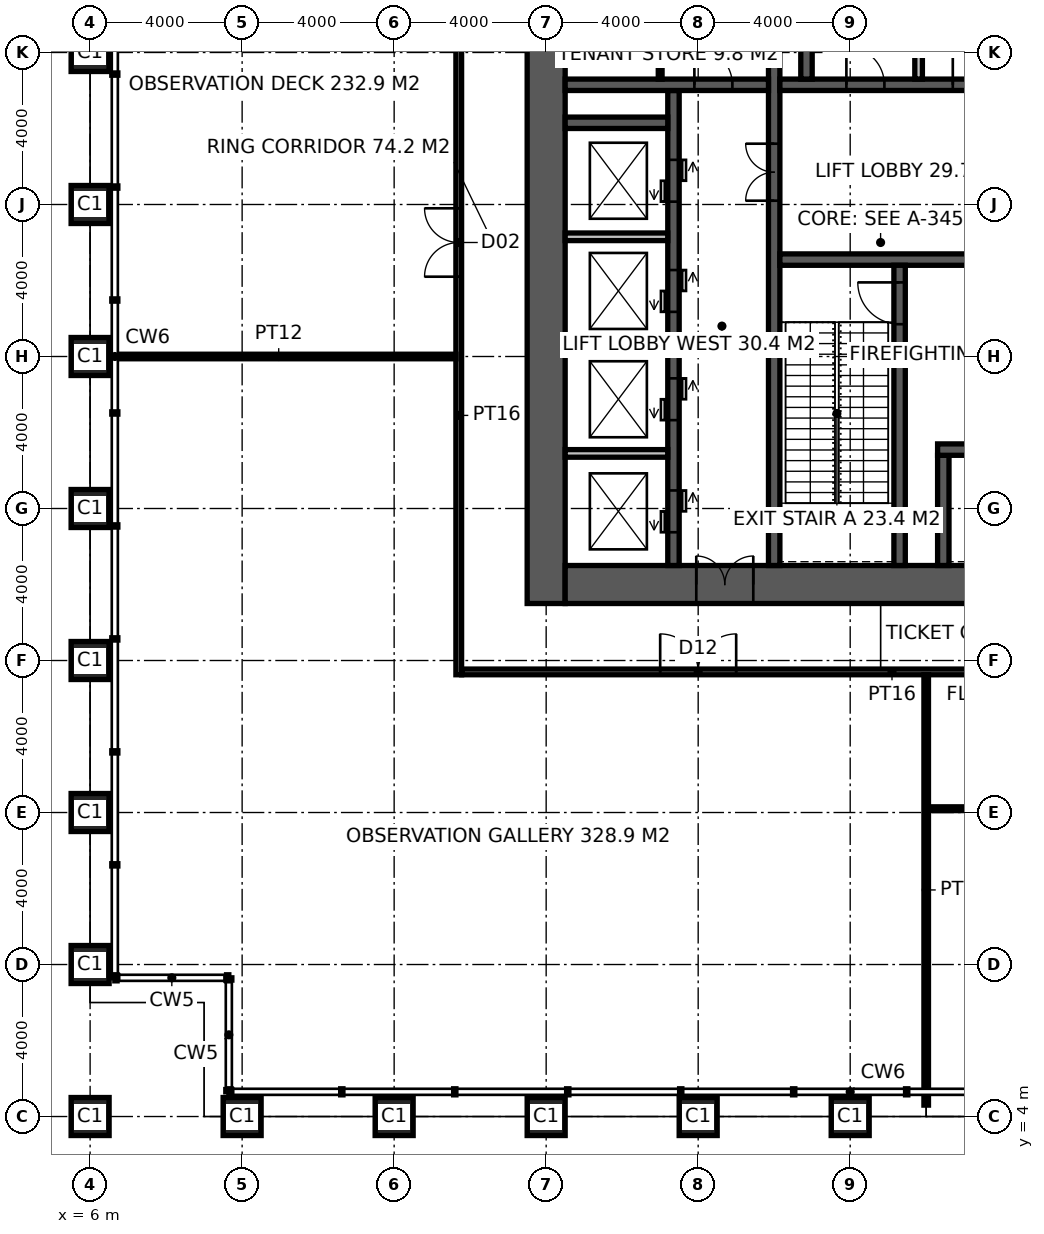
"""IFC4 building model, lengths in metres.
Left out: names, types, materials, properties, quantities, classifications, styles, units other than length and angle.
Written with IfcOpenShell. Run it as: python <this file> out.ifc"""

import sys

from ifc_helpers import new_model, si_unit, direction, frame, frame_2d, origin, origin_2d, place, context, subcontext, project, spatial, rectangle, hollow_rectangle, extrude, element, fill, save


model = new_model("IFC4")
c1 = context("Model", 3, precision=1e-05, world=origin(), true_north=direction((0.0, 1.0)))
c2 = subcontext(c1, "Body", "Model", "MODEL_VIEW")
j1 = project(units=[si_unit("LENGTHUNIT", "METRE"), si_unit("PLANEANGLEUNIT", "RADIAN")], contexts=[c1])
p1 = place(None, origin())
s1 = spatial("IfcSite", under=j1, at=p1, CompositionType="ELEMENT")
p2 = place(p1, origin())
s2 = spatial("IfcBuilding", under=s1, at=p2, CompositionType="ELEMENT")
p3 = place(p2, frame((0.0, 0.0, 298.2)))
s3 = spatial("IfcBuildingStorey", under=s2, at=p3, CompositionType="ELEMENT", Elevation=298.2)
p4 = place(p3, frame((6.0, 4.0, 0.0), z_axis=(0.0, 0.0, 1.0), x_axis=(1.0, 0.0, 0.0)))
e1 = element("IfcColumn", 1, at=p4, inside=s3, PredefinedType="COLUMN", context=c2, shape_type="SweptSolid", body=[
    extrude(hollow_rectangle(XDim=1.0, YDim=1.0, WallThickness=0.1, at=origin_2d()), origin(), (0.0, 0.0, 1.0), 6.0),
    extrude(rectangle(XDim=0.99, YDim=0.99, at=origin_2d()), frame((0.0, 0.0, 5.96)), (0.0, 0.0, 1.0), 0.04),
])
for number, where, z_axis, x_axis in (
    (2, (6.0, 8.0, 0.0), (0.0, 0.0, 1.0), (1.0, 0.0, 0.0)),
    (3, (6.0, 12.0, 0.0), (0.0, 0.0, 1.0), (1.0, 0.0, 0.0)),
    (4, (6.0, 16.0, 0.0), (0.0, 0.0, 1.0), (1.0, 0.0, 0.0)),
    (5, (6.0, 20.0, 0.0), (0.0, 0.0, 1.0), (1.0, 0.0, 0.0)),
    (6, (6.0, 24.0, 0.0), (0.0, 0.0, 1.0), (1.0, 0.0, 0.0)),
    (7, (6.0, 28.0, 0.0), (0.0, 0.0, 1.0), (1.0, 0.0, 0.0)),
    (8, (6.0, 32.0, 0.0), (0.0, 0.0, 1.0), (1.0, 0.0, 0.0)),
    (9, (10.0, 4.0, 0.0), (0.0, 0.0, 1.0), (1.0, 0.0, 0.0)),
    (10, (14.0, 4.0, 0.0), (0.0, 0.0, 1.0), (1.0, 0.0, 0.0)),
    (11, (18.0, 4.0, 0.0), (0.0, 0.0, 1.0), (1.0, 0.0, 0.0)),
    (12, (22.0, 4.0, 0.0), (0.0, 0.0, 1.0), (1.0, 0.0, 0.0)),
    (13, (26.0, 4.0, 0.0), (0.0, 0.0, 1.0), (1.0, 0.0, 0.0)),
):
    element("IfcColumn", number, at=place(p3, frame(where, z_axis=z_axis, x_axis=x_axis)), inside=s3, PredefinedType="COLUMN", context=c2, shape_type="SweptSolid", body=[
        extrude(hollow_rectangle(XDim=1.0, YDim=1.0, WallThickness=0.1, at=origin_2d()), origin(), (0.0, 0.0, 1.0), 6.0),
    ])
p5 = place(p3, frame((18.0, 17.5, -0.15), z_axis=(0.0, 0.0, 1.0), x_axis=(0.0, 1.0, 0.0)))
e14 = element("IfcWall", 14, at=p5, inside=s3, PredefinedType="SHEAR", context=c2, shape_type="SweptSolid", body=[
    extrude(rectangle(XDim=19.0, YDim=1.0, at=frame_2d((9.5, 0.0))), origin(), (0.0, 0.0, 1.0), 5.85),
])
p6 = place(p3, frame((18.5, 18.0, -0.15), z_axis=(0.0, 0.0, 1.0), x_axis=(1.0, 0.0, 0.0)))
e15 = element("IfcWall", 15, at=p6, inside=s3, PredefinedType="SHEAR", context=c2, shape_type="SweptSolid", body=[
    extrude(rectangle(XDim=17.6, YDim=1.0, at=frame_2d((8.8, 0.0))), origin(), (0.0, 0.0, 1.0), 5.85),
])
p7 = place(p6, frame((3.45, 0.0, 0.15)))
e16 = element("IfcOpeningElement", 16, at=p7, cuts=e15, PredefinedType="OPENING", context=c2, shape_type="SweptSolid", body=[
    extrude(rectangle(XDim=1.5, YDim=2.4, at=frame_2d((0.75, 1.2))), frame((0.0, 0.51, 0.0), z_axis=(0.0, -1.0, 0.0), x_axis=(1.0, 0.0, 0.0)), (0.0, 0.0, 1.0), 1.02),
])
p8 = place(p3, frame((24.0, 18.5, -0.15), z_axis=(0.0, 0.0, 1.0), x_axis=(0.0, 1.0, 0.0)))
e17 = element("IfcWall", 17, at=p8, inside=s3, PredefinedType="SHEAR", context=c2, shape_type="SweptSolid", body=[
    extrude(rectangle(XDim=17.0, YDim=0.3, at=frame_2d((8.5, 0.0))), origin(), (0.0, 0.0, 1.0), 5.85),
])
p9 = place(p8, frame((9.6, 0.0, 0.15)))
e18 = element("IfcOpeningElement", 18, at=p9, cuts=e17, PredefinedType="OPENING", context=c2, shape_type="SweptSolid", body=[
    extrude(rectangle(XDim=1.5, YDim=2.4, at=frame_2d((0.75, 1.2))), frame((0.0, 0.16, 0.0), z_axis=(0.0, -1.0, 0.0), x_axis=(1.0, 0.0, 0.0)), (0.0, 0.0, 1.0), 0.32),
])
p10 = place(p3, frame((24.15, 26.55, -0.15), z_axis=(0.0, 0.0, 1.0), x_axis=(1.0, 0.0, 0.0)))
e19 = element("IfcWall", 19, at=p10, inside=s3, PredefinedType="SHEAR", context=c2, shape_type="SweptSolid", body=[
    extrude(rectangle(XDim=11.25, YDim=0.3, at=frame_2d((5.625, 0.0))), origin(), (0.0, 0.0, 1.0), 5.85),
])
p11 = place(p10, frame((9.2, 0.0, 0.15)))
e20 = element("IfcOpeningElement", 20, at=p11, cuts=e19, PredefinedType="OPENING", context=c2, shape_type="SweptSolid", body=[
    extrude(rectangle(XDim=1.1, YDim=2.2, at=frame_2d((0.55, 1.1))), frame((0.0, 0.16, 0.0), z_axis=(0.0, -1.0, 0.0), x_axis=(1.0, 0.0, 0.0)), (0.0, 0.0, 1.0), 0.32),
])
p12 = place(p10, frame((4.9, 0.0, 0.15)))
e21 = element("IfcOpeningElement", 21, at=p12, cuts=e19, PredefinedType="OPENING", context=c2, shape_type="SweptSolid", body=[
    extrude(rectangle(XDim=1.5, YDim=2.4, at=frame_2d((0.75, 1.2))), frame((0.0, 0.16, 0.0), z_axis=(0.0, -1.0, 0.0), x_axis=(1.0, 0.0, 0.0)), (0.0, 0.0, 1.0), 0.32),
])
p13 = place(p3, frame((27.3, 18.5, -0.15), z_axis=(0.0, 0.0, 1.0), x_axis=(0.0, 1.0, 0.0)))
e22 = element("IfcWall", 22, at=p13, inside=s3, PredefinedType="SHEAR", context=c2, shape_type="SweptSolid", body=[
    extrude(rectangle(XDim=7.9, YDim=0.3, at=frame_2d((3.95, 0.0))), origin(), (0.0, 0.0, 1.0), 5.85),
])
p14 = place(p13, frame((6.35, 0.0, 0.15)))
e23 = element("IfcOpeningElement", 23, at=p14, cuts=e22, PredefinedType="OPENING", context=c2, shape_type="SweptSolid", body=[
    extrude(rectangle(XDim=1.1, YDim=2.2, at=frame_2d((0.55, 1.1))), frame((0.0, 0.16, 0.0), z_axis=(0.0, -1.0, 0.0), x_axis=(1.0, 0.0, 0.0)), (0.0, 0.0, 1.0), 0.32),
])
p15 = place(p3, frame((28.45, 18.5, -0.15), z_axis=(0.0, 0.0, 1.0), x_axis=(0.0, 1.0, 0.0)))
e24 = element("IfcWall", 24, at=p15, inside=s3, PredefinedType="SHEAR", context=c2, shape_type="SweptSolid", body=[
    extrude(rectangle(XDim=2.9, YDim=0.3, at=frame_2d((1.45, 0.0))), origin(), (0.0, 0.0, 1.0), 5.85),
])
p16 = place(p3, frame((28.3, 21.55, -0.15), z_axis=(0.0, 0.0, 1.0), x_axis=(1.0, 0.0, 0.0)))
e25 = element("IfcWall", 25, at=p16, inside=s3, PredefinedType="SHEAR", context=c2, shape_type="SweptSolid", body=[
    extrude(rectangle(XDim=3.8, YDim=0.3, at=frame_2d((1.9, 0.0))), origin(), (0.0, 0.0, 1.0), 5.85),
])
p17 = place(p16, frame((1.05, 0.0, 0.15)))
e26 = element("IfcOpeningElement", 26, at=p17, cuts=e25, PredefinedType="OPENING", context=c2, shape_type="SweptSolid", body=[
    extrude(rectangle(XDim=1.3, YDim=2.4, at=frame_2d((0.65, 1.2))), frame((0.0, 0.16, 0.0), z_axis=(0.0, -1.0, 0.0), x_axis=(1.0, 0.0, 0.0)), (0.0, 0.0, 1.0), 0.32),
])
p18 = place(p3, frame((24.15, 31.15, -0.15), z_axis=(0.0, 0.0, 1.0), x_axis=(1.0, 0.0, 0.0)))
e27 = element("IfcWall", 27, at=p18, inside=s3, PredefinedType="SHEAR", context=c2, shape_type="SweptSolid", body=[
    extrude(rectangle(XDim=11.25, YDim=0.3, at=frame_2d((5.625, 0.0))), origin(), (0.0, 0.0, 1.0), 5.85),
])
p19 = place(p18, frame((1.75, 0.0, 0.15)))
e28 = element("IfcOpeningElement", 28, at=p19, cuts=e27, PredefinedType="OPENING", context=c2, shape_type="SweptSolid", body=[
    extrude(rectangle(XDim=1.0, YDim=2.2, at=frame_2d((0.5, 1.1))), frame((0.0, 0.16, 0.0), z_axis=(0.0, -1.0, 0.0), x_axis=(1.0, 0.0, 0.0)), (0.0, 0.0, 1.0), 0.32),
])
p20 = place(p18, frame((4.55, 0.0, 0.15)))
e29 = element("IfcOpeningElement", 29, at=p20, cuts=e27, PredefinedType="OPENING", context=c2, shape_type="SweptSolid", body=[
    extrude(rectangle(XDim=1.0, YDim=2.2, at=frame_2d((0.5, 1.1))), frame((0.0, 0.16, 0.0), z_axis=(0.0, -1.0, 0.0), x_axis=(1.0, 0.0, 0.0)), (0.0, 0.0, 1.0), 0.32),
])
p21 = place(p18, frame((7.25, 0.0, 0.15)))
e30 = element("IfcOpeningElement", 30, at=p21, cuts=e27, PredefinedType="OPENING", context=c2, shape_type="SweptSolid", body=[
    extrude(rectangle(XDim=1.4, YDim=2.4, at=frame_2d((0.7, 1.2))), frame((0.0, 0.16, 0.0), z_axis=(0.0, -1.0, 0.0), x_axis=(1.0, 0.0, 0.0)), (0.0, 0.0, 1.0), 0.32),
])
p22 = place(p3, frame((21.35, 18.5, -0.15), z_axis=(0.0, 0.0, 1.0), x_axis=(0.0, 1.0, 0.0)))
e31 = element("IfcWall", 31, at=p22, inside=s3, PredefinedType="SHEAR", context=c2, shape_type="SweptSolid", body=[
    extrude(rectangle(XDim=12.5, YDim=0.3, at=frame_2d((6.25, 0.0))), origin(), (0.0, 0.0, 1.0), 5.85),
])
p23 = place(p22, frame((0.875, 0.0, 0.15)))
e32 = element("IfcOpeningElement", 32, at=p23, cuts=e31, PredefinedType="OPENING", context=c2, shape_type="SweptSolid", body=[
    extrude(rectangle(XDim=1.1, YDim=2.2, at=frame_2d((0.55, 1.1))), frame((0.0, 0.16, 0.0), z_axis=(0.0, -1.0, 0.0), x_axis=(1.0, 0.0, 0.0)), (0.0, 0.0, 1.0), 0.32),
])
p24 = place(p22, frame((3.825, 0.0, 0.15)))
e33 = element("IfcOpeningElement", 33, at=p24, cuts=e31, PredefinedType="OPENING", context=c2, shape_type="SweptSolid", body=[
    extrude(rectangle(XDim=1.1, YDim=2.2, at=frame_2d((0.55, 1.1))), frame((0.0, 0.16, 0.0), z_axis=(0.0, -1.0, 0.0), x_axis=(1.0, 0.0, 0.0)), (0.0, 0.0, 1.0), 0.32),
])
p25 = place(p22, frame((6.675, 0.0, 0.15)))
e34 = element("IfcOpeningElement", 34, at=p25, cuts=e31, PredefinedType="OPENING", context=c2, shape_type="SweptSolid", body=[
    extrude(rectangle(XDim=1.1, YDim=2.2, at=frame_2d((0.55, 1.1))), frame((0.0, 0.16, 0.0), z_axis=(0.0, -1.0, 0.0), x_axis=(1.0, 0.0, 0.0)), (0.0, 0.0, 1.0), 0.32),
])
p26 = place(p22, frame((9.575, 0.0, 0.15)))
e35 = element("IfcOpeningElement", 35, at=p26, cuts=e31, PredefinedType="OPENING", context=c2, shape_type="SweptSolid", body=[
    extrude(rectangle(XDim=1.1, YDim=2.2, at=frame_2d((0.55, 1.1))), frame((0.0, 0.16, 0.0), z_axis=(0.0, -1.0, 0.0), x_axis=(1.0, 0.0, 0.0)), (0.0, 0.0, 1.0), 0.32),
])
p27 = place(p3, frame((18.5, 31.15, -0.15), z_axis=(0.0, 0.0, 1.0), x_axis=(1.0, 0.0, 0.0)))
e36 = element("IfcWall", 36, at=p27, inside=s3, PredefinedType="SHEAR", context=c2, shape_type="SweptSolid", body=[
    extrude(rectangle(XDim=5.35, YDim=0.3, at=frame_2d((2.675, 0.0))), origin(), (0.0, 0.0, 1.0), 5.85),
])
p28 = place(p27, frame((3.4, 0.0, 0.15)))
e37 = element("IfcOpeningElement", 37, at=p28, cuts=e36, PredefinedType="OPENING", context=c2, shape_type="SweptSolid", body=[
    extrude(rectangle(XDim=1.0, YDim=2.2, at=frame_2d((0.5, 1.1))), frame((0.0, 0.16, 0.0), z_axis=(0.0, -1.0, 0.0), x_axis=(1.0, 0.0, 0.0)), (0.0, 0.0, 1.0), 0.32),
])
p29 = place(p3, frame((18.5, 30.15, -0.15), z_axis=(0.0, 0.0, 1.0), x_axis=(1.0, 0.0, 0.0)))
e38 = element("IfcWall", 38, at=p29, inside=s3, PredefinedType="SHEAR", context=c2, shape_type="SweptSolid", body=[
    extrude(rectangle(XDim=2.7, YDim=0.3, at=frame_2d((1.35, 0.0))), origin(), (0.0, 0.0, 1.0), 5.85),
])
p30 = place(p3, frame((24.85, 31.3, -0.15), z_axis=(0.0, 0.0, 1.0), x_axis=(0.0, 1.0, 0.0)))
e39 = element("IfcWall", 39, at=p30, inside=s3, PredefinedType="SHEAR", context=c2, shape_type="SweptSolid", body=[
    extrude(rectangle(XDim=4.2, YDim=0.3, at=frame_2d((2.1, 0.0))), origin(), (0.0, 0.0, 1.0), 5.85),
])
p31 = place(p3, frame((27.8, 31.3, 0.0), z_axis=(0.0, 0.0, 1.0), x_axis=(0.0, 1.0, 0.0)))
e40 = element("IfcWall", 40, at=p31, inside=s3, PredefinedType="SOLIDWALL", context=c2, shape_type="SweptSolid", body=[
    extrude(rectangle(XDim=2.8, YDim=0.2, at=frame_2d((1.4, 0.0))), origin(), (0.0, 0.0, 1.0), 5.7),
])
for number, where, z_axis, x_axis in (
    (41, (18.5, 21.45, -0.15), (0.0, 0.0, 1.0), (1.0, 0.0, 0.0)),
    (42, (18.5, 24.3, -0.15), (0.0, 0.0, 1.0), (1.0, 0.0, 0.0)),
    (43, (18.5, 27.15, -0.15), (0.0, 0.0, 1.0), (1.0, 0.0, 0.0)),
):
    element("IfcWall", number, at=place(p3, frame(where, z_axis=z_axis, x_axis=x_axis)), inside=s3, PredefinedType="SOLIDWALL", context=c2, shape_type="SweptSolid", body=[
        extrude(rectangle(XDim=2.7, YDim=0.2, at=frame_2d((1.35, 0.0))), origin(), (0.0, 0.0, 1.0), 5.85),
    ])
p32 = place(p3, frame((21.0, 31.3, 0.0), z_axis=(0.0, 0.0, 1.0), x_axis=(0.0, 1.0, 0.0)))
e44 = element("IfcWall", 44, at=p32, inside=s3, PredefinedType="PARTITIONING", context=c2, shape_type="SweptSolid", body=[
    extrude(rectangle(XDim=4.2, YDim=0.1, at=frame_2d((2.1, 0.0))), origin(), (0.0, 0.0, 1.0), 5.7),
])
p33 = place(p32, frame((1.55, 0.0, 0.0)))
e45 = element("IfcOpeningElement", 45, at=p33, cuts=e44, PredefinedType="OPENING", context=c2, shape_type="SweptSolid", body=[
    extrude(rectangle(XDim=1.0, YDim=2.2, at=frame_2d((0.5, 1.1))), frame((0.0, 0.06, 0.0), z_axis=(0.0, -1.0, 0.0), x_axis=(1.0, 0.0, 0.0)), (0.0, 0.0, 1.0), 0.12),
])
p34 = place(p3, frame((15.7, 15.625, 0.0), z_axis=(0.0, 0.0, 1.0), x_axis=(0.0, 1.0, 0.0)))
e46 = element("IfcWall", 46, at=p34, inside=s3, PredefinedType="PARTITIONING", context=c2, shape_type="SweptSolid", body=[
    extrude(rectangle(XDim=22.75, YDim=0.15, at=frame_2d((11.375, 0.0))), origin(), (0.0, 0.0, 1.0), 5.7),
])
p35 = place(p34, frame((10.475, 0.0, 0.0)))
e47 = element("IfcOpeningElement", 47, at=p35, cuts=e46, PredefinedType="OPENING", context=c2, shape_type="SweptSolid", body=[
    extrude(rectangle(XDim=1.8, YDim=2.4, at=frame_2d((0.9, 1.2))), frame((0.0, 0.085, 0.0), z_axis=(0.0, -1.0, 0.0), x_axis=(1.0, 0.0, 0.0)), (0.0, 0.0, 1.0), 0.17),
])
p36 = place(p3, frame((15.775, 15.7, 0.0), z_axis=(0.0, 0.0, 1.0), x_axis=(1.0, 0.0, 0.0)))
e48 = element("IfcWall", 48, at=p36, inside=s3, PredefinedType="PARTITIONING", context=c2, shape_type="SweptSolid", body=[
    extrude(rectangle(XDim=22.65, YDim=0.15, at=frame_2d((11.325, 0.0))), origin(), (0.0, 0.0, 1.0), 5.7),
])
p37 = place(p36, frame((5.225, 0.0, 0.0)))
e49 = element("IfcOpeningElement", 49, at=p37, cuts=e48, PredefinedType="OPENING", context=c2, shape_type="SweptSolid", body=[
    extrude(rectangle(XDim=2.0, YDim=2.7, at=frame_2d((1.0, 1.35))), frame((0.0, 0.085, 0.0), z_axis=(0.0, -1.0, 0.0), x_axis=(1.0, 0.0, 0.0)), (0.0, 0.0, 1.0), 0.17),
])
p38 = place(p3, frame((6.3, 24.0, 0.0), z_axis=(0.0, 0.0, 1.0), x_axis=(1.0, 0.0, 0.0)))
e50 = element("IfcWall", 50, at=p38, inside=s3, PredefinedType="PARTITIONING", context=c2, shape_type="SweptSolid", body=[
    extrude(rectangle(XDim=9.325, YDim=0.12, at=frame_2d((4.663, 0.0))), origin(), (0.0, 0.0, 1.0), 4.8),
])
p39 = place(p3, frame((28.0, 4.3, 0.0), z_axis=(0.0, 0.0, 1.0), x_axis=(0.0, 1.0, 0.0)))
e51 = element("IfcWall", 51, at=p39, inside=s3, PredefinedType="PARTITIONING", context=c2, shape_type="SweptSolid", body=[
    extrude(rectangle(XDim=11.325, YDim=0.12, at=frame_2d((5.663, 0.0))), origin(), (0.0, 0.0, 1.0), 5.7),
])
p40 = place(p3, frame((28.061, 12.1, 0.0), z_axis=(0.0, 0.0, 1.0), x_axis=(1.0, 0.0, 0.0)))
e52 = element("IfcWall", 52, at=p40, inside=s3, PredefinedType="PARTITIONING", context=c2, shape_type="SweptSolid", body=[
    extrude(rectangle(XDim=10.489, YDim=0.1, at=frame_2d((5.245, 0.0))), origin(), (0.0, 0.0, 1.0), 5.7),
])
p41 = place(p40, frame((1.365, 0.0, 0.0)))
e53 = element("IfcOpeningElement", 53, at=p41, cuts=e52, PredefinedType="OPENING", context=c2, shape_type="SweptSolid", body=[
    extrude(rectangle(XDim=1.0, YDim=2.2, at=frame_2d((0.5, 1.1))), frame((0.0, 0.06, 0.0), z_axis=(0.0, -1.0, 0.0), x_axis=(1.0, 0.0, 0.0)), (0.0, 0.0, 1.0), 0.12),
])
p42 = place(p40, frame((4.765, 0.0, 0.0)))
e54 = element("IfcOpeningElement", 54, at=p42, cuts=e52, PredefinedType="OPENING", context=c2, shape_type="SweptSolid", body=[
    extrude(rectangle(XDim=1.0, YDim=2.2, at=frame_2d((0.5, 1.1))), frame((0.0, 0.06, 0.0), z_axis=(0.0, -1.0, 0.0), x_axis=(1.0, 0.0, 0.0)), (0.0, 0.0, 1.0), 0.12),
])
p43 = place(p40, frame((8.09, 0.0, 0.0)))
e55 = element("IfcOpeningElement", 55, at=p43, cuts=e52, PredefinedType="OPENING", context=c2, shape_type="SweptSolid", body=[
    extrude(rectangle(XDim=1.0, YDim=2.2, at=frame_2d((0.5, 1.1))), frame((0.0, 0.06, 0.0), z_axis=(0.0, -1.0, 0.0), x_axis=(1.0, 0.0, 0.0)), (0.0, 0.0, 1.0), 0.12),
])
p44 = place(p14, origin())
e56 = element("IfcDoor", 56, at=p44, inside=s3, OperationType="SINGLE_SWING_RIGHT", PredefinedType="DOOR", context=c2, shape_type="SweptSolid", body=[
    extrude(rectangle(XDim=1.1, YDim=2.2, at=frame_2d((0.55, 1.1))), frame((0.0, 0.025, 0.0), z_axis=(0.0, -1.0, 0.0), x_axis=(1.0, 0.0, 0.0)), (0.0, 0.0, 1.0), 0.05),
])
fill(e23, e56)
p45 = place(p9, origin())
e57 = element("IfcDoor", 57, at=p45, inside=s3, OperationType="DOUBLE_DOOR_DOUBLE_SWING", PredefinedType="DOOR", context=c2, shape_type="SweptSolid", body=[
    extrude(rectangle(XDim=1.5, YDim=2.4, at=frame_2d((0.75, 1.2))), frame((0.0, 0.025, 0.0), z_axis=(0.0, -1.0, 0.0), x_axis=(1.0, 0.0, 0.0)), (0.0, 0.0, 1.0), 0.05),
])
fill(e18, e57)
p46 = place(p28, origin())
e58 = element("IfcDoor", 58, at=p46, inside=s3, OperationType="SINGLE_SWING_LEFT", PredefinedType="DOOR", context=c2, shape_type="SweptSolid", body=[
    extrude(rectangle(XDim=1.0, YDim=2.2, at=frame_2d((0.5, 1.1))), frame((0.0, 0.025, 0.0), z_axis=(0.0, -1.0, 0.0), x_axis=(1.0, 0.0, 0.0)), (0.0, 0.0, 1.0), 0.05),
])
fill(e37, e58)
p47 = place(p19, origin())
e59 = element("IfcDoor", 59, at=p47, inside=s3, OperationType="SINGLE_SWING_LEFT", PredefinedType="DOOR", context=c2, shape_type="SweptSolid", body=[
    extrude(rectangle(XDim=1.0, YDim=2.2, at=frame_2d((0.5, 1.1))), frame((0.0, 0.025, 0.0), z_axis=(0.0, -1.0, 0.0), x_axis=(1.0, 0.0, 0.0)), (0.0, 0.0, 1.0), 0.05),
])
fill(e28, e59)
p48 = place(p20, origin())
e60 = element("IfcDoor", 60, at=p48, inside=s3, OperationType="SINGLE_SWING_LEFT", PredefinedType="DOOR", context=c2, shape_type="SweptSolid", body=[
    extrude(rectangle(XDim=1.0, YDim=2.2, at=frame_2d((0.5, 1.1))), frame((0.0, 0.025, 0.0), z_axis=(0.0, -1.0, 0.0), x_axis=(1.0, 0.0, 0.0)), (0.0, 0.0, 1.0), 0.05),
])
fill(e29, e60)
p49 = place(p7, origin())
e61 = element("IfcDoor", 61, at=p49, inside=s3, OperationType="DOUBLE_DOOR_DOUBLE_SWING", PredefinedType="DOOR", context=c2, shape_type="SweptSolid", body=[
    extrude(rectangle(XDim=1.5, YDim=2.4, at=frame_2d((0.75, 1.2))), frame((0.0, 0.025, 0.0), z_axis=(0.0, -1.0, 0.0), x_axis=(1.0, 0.0, 0.0)), (0.0, 0.0, 1.0), 0.05),
])
fill(e16, e61)
p50 = place(p37, origin())
e62 = element("IfcDoor", 62, at=p50, inside=s3, OperationType="DOUBLE_DOOR_DOUBLE_SWING", PredefinedType="DOOR", context=c2, shape_type="SweptSolid", body=[
    extrude(rectangle(XDim=2.0, YDim=2.7, at=frame_2d((1.0, 1.35))), frame((0.0, 0.025, 0.0), z_axis=(0.0, -1.0, 0.0), x_axis=(1.0, 0.0, 0.0)), (0.0, 0.0, 1.0), 0.05),
])
fill(e49, e62)
p51 = place(p35, origin())
e63 = element("IfcDoor", 63, at=p51, inside=s3, OperationType="DOUBLE_DOOR_DOUBLE_SWING", PredefinedType="DOOR", context=c2, shape_type="SweptSolid", body=[
    extrude(rectangle(XDim=1.8, YDim=2.4, at=frame_2d((0.9, 1.2))), frame((0.0, 0.025, 0.0), z_axis=(0.0, -1.0, 0.0), x_axis=(1.0, 0.0, 0.0)), (0.0, 0.0, 1.0), 0.05),
])
fill(e47, e63)
p52 = place(p23, origin())
e64 = element("IfcDoor", 64, at=p52, inside=s3, OperationType="DOUBLE_DOOR_SLIDING", PredefinedType="DOOR", context=c2, shape_type="SweptSolid", body=[
    extrude(rectangle(XDim=1.1, YDim=2.2, at=frame_2d((0.55, 1.1))), frame((0.0, 0.025, 0.0), z_axis=(0.0, -1.0, 0.0), x_axis=(1.0, 0.0, 0.0)), (0.0, 0.0, 1.0), 0.05),
])
fill(e32, e64)
p53 = place(p24, origin())
e65 = element("IfcDoor", 65, at=p53, inside=s3, OperationType="DOUBLE_DOOR_SLIDING", PredefinedType="DOOR", context=c2, shape_type="SweptSolid", body=[
    extrude(rectangle(XDim=1.1, YDim=2.2, at=frame_2d((0.55, 1.1))), frame((0.0, 0.025, 0.0), z_axis=(0.0, -1.0, 0.0), x_axis=(1.0, 0.0, 0.0)), (0.0, 0.0, 1.0), 0.05),
])
fill(e33, e65)
p54 = place(p25, origin())
e66 = element("IfcDoor", 66, at=p54, inside=s3, OperationType="DOUBLE_DOOR_SLIDING", PredefinedType="DOOR", context=c2, shape_type="SweptSolid", body=[
    extrude(rectangle(XDim=1.1, YDim=2.2, at=frame_2d((0.55, 1.1))), frame((0.0, 0.025, 0.0), z_axis=(0.0, -1.0, 0.0), x_axis=(1.0, 0.0, 0.0)), (0.0, 0.0, 1.0), 0.05),
])
fill(e34, e66)
p55 = place(p26, origin())
e67 = element("IfcDoor", 67, at=p55, inside=s3, OperationType="DOUBLE_DOOR_SLIDING", PredefinedType="DOOR", context=c2, shape_type="SweptSolid", body=[
    extrude(rectangle(XDim=1.1, YDim=2.2, at=frame_2d((0.55, 1.1))), frame((0.0, 0.025, 0.0), z_axis=(0.0, -1.0, 0.0), x_axis=(1.0, 0.0, 0.0)), (0.0, 0.0, 1.0), 0.05),
])
fill(e35, e67)
save(model, sys.argv[1])
